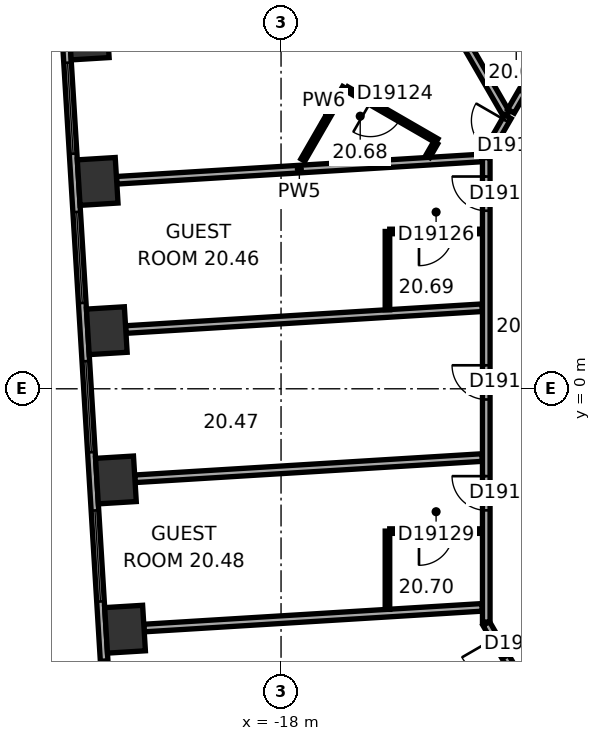
"""IFC4 building model, lengths in metres.
Left out: names, types, materials, properties, quantities, classifications, styles, units other than length and angle.
Written with IfcOpenShell. Run it as: python <this file> out.ifc"""

import sys

from ifc_helpers import new_model, si_unit, direction, frame, frame_2d, origin, origin_2d, place, context, subcontext, project, spatial, rectangle, extrude, element, fill, save


model = new_model("IFC4")
c1 = context("Model", 3, precision=1e-05, world=origin(), true_north=direction((0.0, 1.0)))
c2 = subcontext(c1, "Body", "Model", "MODEL_VIEW")
j1 = project(units=[si_unit("LENGTHUNIT", "METRE"), si_unit("PLANEANGLEUNIT", "RADIAN")], contexts=[c1])
p1 = place(None, origin())
s1 = spatial("IfcSite", under=j1, at=p1, CompositionType="ELEMENT")
p2 = place(p1, origin())
s2 = spatial("IfcBuilding", under=s1, at=p2, CompositionType="ELEMENT")
p3 = place(p2, frame((0.0, 0.0, 90.2)))
s3 = spatial("IfcBuildingStorey", under=s2, at=p3, CompositionType="ELEMENT", Elevation=90.2)
p4 = place(p3, frame((-23.066, 9.383, 0.0), z_axis=(0.0, 0.0, 1.0), x_axis=(0.061048539535, -0.998134798422, 0.0)))
e1 = element("IfcColumn", 1, at=p4, inside=s3, PredefinedType="COLUMN", context=c2, shape_type="SweptSolid", body=[
    extrude(rectangle(XDim=1.4, YDim=1.0, at=origin_2d()), origin(), (0.0, 0.0, 1.0), 3.3),
])
for number, where, z_axis, x_axis in (
    (2, (-22.826, 5.456, 0.0), (0.0, 0.0, 1.0), (0.061, -0.998, 0.0)),
    (3, (-22.585, 1.529, 0.0), (0.0, 0.0, 1.0), (0.061, -0.998, 0.0)),
    (4, (-22.345, -2.399, 0.0), (0.0, 0.0, 1.0), (0.061, -0.998, 0.0)),
    (5, (-22.105, -6.326, 0.0), (0.0, 0.0, 1.0), (0.061, -0.998, 0.0)),
):
    element("IfcColumn", number, at=place(p3, frame(where, z_axis=z_axis, x_axis=x_axis)), inside=s3, PredefinedType="COLUMN", context=c2, shape_type="SweptSolid", body=[
        extrude(rectangle(XDim=1.2, YDim=1.0, at=origin_2d()), origin(), (0.0, 0.0, 1.0), 3.3),
    ])
p5 = place(p3, frame((-23.713, 10.131, 0.0), z_axis=(0.0, 0.0, 1.0), x_axis=(0.061040439785, -0.998135293791, 0.0)))
e6 = element("IfcWall", 6, at=p5, inside=s3, PredefinedType="STANDARD", context=c2, shape_type="SweptSolid", body=[
    extrude(rectangle(XDim=21.246, YDim=0.2, at=frame_2d((10.623, 0.0))), origin(), (0.0, 0.0, 1.0), 3.3),
])
p6 = place(p5, frame((1.553, 0.0, 0.8)))
e7 = element("IfcOpeningElement", 7, at=p6, cuts=e6, PredefinedType="OPENING", context=c2, shape_type="SweptSolid", body=[
    extrude(rectangle(XDim=2.4, YDim=1.7, at=frame_2d((1.2, 0.85))), frame((0.0, 0.11, 0.0), z_axis=(0.0, -1.0, 0.0), x_axis=(1.0, 0.0, 0.0)), (0.0, 0.0, 1.0), 0.22),
])
p7 = place(p5, frame((5.488, 0.0, 0.8)))
e8 = element("IfcOpeningElement", 8, at=p7, cuts=e6, PredefinedType="OPENING", context=c2, shape_type="SweptSolid", body=[
    extrude(rectangle(XDim=2.4, YDim=1.7, at=frame_2d((1.2, 0.85))), frame((0.0, 0.11, 0.0), z_axis=(0.0, -1.0, 0.0), x_axis=(1.0, 0.0, 0.0)), (0.0, 0.0, 1.0), 0.22),
])
p8 = place(p5, frame((9.422, 0.0, 0.8)))
e9 = element("IfcOpeningElement", 9, at=p8, cuts=e6, PredefinedType="OPENING", context=c2, shape_type="SweptSolid", body=[
    extrude(rectangle(XDim=2.4, YDim=1.7, at=frame_2d((1.2, 0.85))), frame((0.0, 0.11, 0.0), z_axis=(0.0, -1.0, 0.0), x_axis=(1.0, 0.0, 0.0)), (0.0, 0.0, 1.0), 0.22),
])
p9 = place(p5, frame((13.357, 0.0, 0.8)))
e10 = element("IfcOpeningElement", 10, at=p9, cuts=e6, PredefinedType="OPENING", context=c2, shape_type="SweptSolid", body=[
    extrude(rectangle(XDim=2.4, YDim=1.7, at=frame_2d((1.2, 0.85))), frame((0.0, 0.11, 0.0), z_axis=(0.0, -1.0, 0.0), x_axis=(1.0, 0.0, 0.0)), (0.0, 0.0, 1.0), 0.22),
])
p10 = place(p5, frame((17.292, 0.0, 0.8)))
e11 = element("IfcOpeningElement", 11, at=p10, cuts=e6, PredefinedType="OPENING", context=c2, shape_type="SweptSolid", body=[
    extrude(rectangle(XDim=2.4, YDim=1.7, at=frame_2d((1.2, 0.85))), frame((0.0, 0.11, 0.0), z_axis=(0.0, -1.0, 0.0), x_axis=(1.0, 0.0, 0.0)), (0.0, 0.0, 1.0), 0.22),
])
p11 = place(p3, frame((-22.327, 5.486, 0.0), z_axis=(0.0, 0.0, 1.0), x_axis=(0.998135194863, 0.061042057435, 0.0)))
e12 = element("IfcWall", 12, at=p11, inside=s3, PredefinedType="PARTITIONING", context=c2, shape_type="SweptSolid", body=[
    extrude(rectangle(XDim=9.635, YDim=0.2, at=frame_2d((4.817, 0.0))), origin(), (0.0, 0.0, 1.0), 3.05),
])
p12 = place(p3, frame((-22.086, 1.559, 0.0), z_axis=(0.0, 0.0, 1.0), x_axis=(0.99813491363, 0.061046655873, 0.0)))
e13 = element("IfcWall", 13, at=p12, inside=s3, PredefinedType="PARTITIONING", context=c2, shape_type="SweptSolid", body=[
    extrude(rectangle(XDim=9.394, YDim=0.2, at=frame_2d((4.697, 0.0))), origin(), (0.0, 0.0, 1.0), 2.6),
])
p13 = place(p3, frame((-21.846, -2.368, 0.0), z_axis=(0.0, 0.0, 1.0), x_axis=(0.998134617584, 0.061051496129, 0.0)))
e14 = element("IfcWall", 14, at=p13, inside=s3, PredefinedType="PARTITIONING", context=c2, shape_type="SweptSolid", body=[
    extrude(rectangle(XDim=9.154, YDim=0.2, at=frame_2d((4.577, 0.0))), origin(), (0.0, 0.0, 1.0), 3.05),
])
p14 = place(p3, frame((-21.606, -6.295, 0.0), z_axis=(0.0, 0.0, 1.0), x_axis=(0.998134305525, 0.061056597794, 0.0)))
e15 = element("IfcWall", 15, at=p14, inside=s3, PredefinedType="PARTITIONING", context=c2, shape_type="SweptSolid", body=[
    extrude(rectangle(XDim=8.913, YDim=0.2, at=frame_2d((4.457, 0.0))), origin(), (0.0, 0.0, 1.0), 2.6),
])
p15 = place(p3, frame((-17.426, 6.019, 0.0), z_axis=(0.0, 0.0, 1.0), x_axis=(0.50002983664, 0.866008176907, 0.0)))
e16 = element("IfcWall", 16, at=p15, inside=s3, PredefinedType="PARTITIONING", context=c2, shape_type="SweptSolid", body=[
    extrude(rectangle(XDim=2.2, YDim=0.12, at=frame_2d((1.1, 0.0))), origin(), (0.0, 0.0, 1.0), 3.05),
])
p16 = place(p3, frame((-16.898, 15.59, 0.0), z_axis=(0.0, 0.0, 1.0), x_axis=(0.499994742786, -0.866028439017, 0.0)))
e17 = element("IfcWall", 17, at=p16, inside=s3, PredefinedType="PARTITIONING", context=c2, shape_type="SweptSolid", body=[
    extrude(rectangle(XDim=9.65, YDim=0.2, at=frame_2d((4.825, 0.0))), origin(), (0.0, 0.0, 1.0), 3.05),
])
p17 = place(p3, frame((-16.274, 7.895, 0.0), z_axis=(0.0, 0.0, 1.0), x_axis=(0.865997131366, -0.500048966069, 0.0)))
e18 = element("IfcWall", 18, at=p17, inside=s3, PredefinedType="PARTITIONING", context=c2, shape_type="SweptSolid", body=[
    extrude(rectangle(XDim=2.74, YDim=0.12, at=frame_2d((1.37, 0.0))), origin(), (0.0, 0.0, 1.0), 3.05),
])
p18 = place(p17, frame((0.72, 0.0, 0.0)))
e19 = element("IfcOpeningElement", 19, at=p18, cuts=e18, PredefinedType="OPENING", context=c2, shape_type="SweptSolid", body=[
    extrude(rectangle(XDim=0.9, YDim=2.1, at=frame_2d((0.45, 1.05))), frame((0.0, 0.07, 0.0), z_axis=(0.0, -1.0, 0.0), x_axis=(1.0, 0.0, 0.0)), (0.0, 0.0, 1.0), 0.14),
])
p19 = place(p3, frame((-15.2, -5.804, 0.0), z_axis=(0.0, 0.0, 1.0), x_axis=(0.0, 1.0, 0.0)))
e20 = element("IfcWall", 20, at=p19, inside=s3, PredefinedType="PARTITIONING", context=c2, shape_type="SweptSolid", body=[
    extrude(rectangle(XDim=2.059, YDim=0.12, at=frame_2d((1.03, 0.0))), origin(), (0.0, 0.0, 1.0), 3.05),
])
p20 = place(p3, frame((-15.2, 2.08, 0.0), z_axis=(0.0, 0.0, 1.0), x_axis=(0.0, 1.0, 0.0)))
e21 = element("IfcWall", 21, at=p20, inside=s3, PredefinedType="PARTITIONING", context=c2, shape_type="SweptSolid", body=[
    extrude(rectangle(XDim=2.059, YDim=0.12, at=frame_2d((1.03, 0.0))), origin(), (0.0, 0.0, 1.0), 3.05),
])
p21 = place(p3, frame((-15.14, -3.744, 0.0), z_axis=(0.0, 0.0, 1.0), x_axis=(1.0, 0.0, 0.0)))
e22 = element("IfcWall", 22, at=p21, inside=s3, PredefinedType="PARTITIONING", context=c2, shape_type="SweptSolid", body=[
    extrude(rectangle(XDim=2.44, YDim=0.12, at=frame_2d((1.22, 0.0))), origin(), (0.0, 0.0, 1.0), 3.05),
])
p22 = place(p21, frame((0.77, 0.0, 0.0)))
e23 = element("IfcOpeningElement", 23, at=p22, cuts=e22, PredefinedType="OPENING", context=c2, shape_type="SweptSolid", body=[
    extrude(rectangle(XDim=0.9, YDim=2.1, at=frame_2d((0.45, 1.05))), frame((0.0, 0.07, 0.0), z_axis=(0.0, -1.0, 0.0), x_axis=(1.0, 0.0, 0.0)), (0.0, 0.0, 1.0), 0.14),
])
p23 = place(p3, frame((-15.14, 4.139, 0.0), z_axis=(0.0, 0.0, 1.0), x_axis=(1.0, 0.0, 0.0)))
e24 = element("IfcWall", 24, at=p23, inside=s3, PredefinedType="PARTITIONING", context=c2, shape_type="SweptSolid", body=[
    extrude(rectangle(XDim=2.44, YDim=0.12, at=frame_2d((1.22, 0.0))), origin(), (0.0, 0.0, 1.0), 3.05),
])
p24 = place(p23, frame((0.77, 0.0, 0.0)))
e25 = element("IfcOpeningElement", 25, at=p24, cuts=e24, PredefinedType="OPENING", context=c2, shape_type="SweptSolid", body=[
    extrude(rectangle(XDim=0.9, YDim=2.1, at=frame_2d((0.45, 1.05))), frame((0.0, 0.07, 0.0), z_axis=(0.0, -1.0, 0.0), x_axis=(1.0, 0.0, 0.0)), (0.0, 0.0, 1.0), 0.14),
])
p25 = place(p3, frame((-13.931, 6.472, 0.0), z_axis=(0.0, 0.0, 1.0), x_axis=(-0.499739399214, -0.866175809448, 0.0)))
e26 = element("IfcWall", 26, at=p25, inside=s3, PredefinedType="PARTITIONING", context=c2, shape_type="SweptSolid", body=[
    extrude(rectangle(XDim=0.416, YDim=0.12, at=frame_2d((0.208, 0.0))), origin(), (0.0, 0.0, 1.0), 3.05),
])
p26 = place(p3, frame((-12.6, -6.177, 0.0), z_axis=(0.0, 0.0, 1.0), x_axis=(0.500063520245, -0.865988727248, 0.0)))
e27 = element("IfcWall", 27, at=p26, inside=s3, PredefinedType="PARTITIONING", context=c2, shape_type="SweptSolid", body=[
    extrude(rectangle(XDim=1.9, YDim=0.2, at=frame_2d((0.95, 0.0))), origin(), (0.0, 0.0, 1.0), 3.05),
])
p27 = place(p26, frame((0.45, 0.0, 0.0)))
e28 = element("IfcOpeningElement", 28, at=p27, cuts=e27, PredefinedType="OPENING", context=c2, shape_type="SweptSolid", body=[
    extrude(rectangle(XDim=1.0, YDim=2.1, at=frame_2d((0.5, 1.05))), frame((0.0, 0.11, 0.0), z_axis=(0.0, -1.0, 0.0), x_axis=(1.0, 0.0, 0.0)), (0.0, 0.0, 1.0), 0.22),
])
p28 = place(p3, frame((-12.6, 6.081, 0.0), z_axis=(0.0, 0.0, 1.0), x_axis=(0.0, -1.0, 0.0)))
e29 = element("IfcWall", 29, at=p28, inside=s3, PredefinedType="PARTITIONING", context=c2, shape_type="SweptSolid", body=[
    extrude(rectangle(XDim=12.219, YDim=0.2, at=frame_2d((6.109, 0.0))), origin(), (0.0, 0.0, 1.0), 3.05),
])
p29 = place(p28, frame((0.496, 0.0, 0.0)))
e30 = element("IfcOpeningElement", 30, at=p29, cuts=e29, PredefinedType="OPENING", context=c2, shape_type="SweptSolid", body=[
    extrude(rectangle(XDim=0.9, YDim=2.1, at=frame_2d((0.45, 1.05))), frame((0.0, 0.11, 0.0), z_axis=(0.0, -1.0, 0.0), x_axis=(1.0, 0.0, 0.0)), (0.0, 0.0, 1.0), 0.22),
])
p30 = place(p28, frame((5.463, 0.0, 0.0)))
e31 = element("IfcOpeningElement", 31, at=p30, cuts=e29, PredefinedType="OPENING", context=c2, shape_type="SweptSolid", body=[
    extrude(rectangle(XDim=0.9, YDim=2.1, at=frame_2d((0.45, 1.05))), frame((0.0, 0.11, 0.0), z_axis=(0.0, -1.0, 0.0), x_axis=(1.0, 0.0, 0.0)), (0.0, 0.0, 1.0), 0.22),
])
p31 = place(p28, frame((8.38, 0.0, 0.0)))
e32 = element("IfcOpeningElement", 32, at=p31, cuts=e29, PredefinedType="OPENING", context=c2, shape_type="SweptSolid", body=[
    extrude(rectangle(XDim=0.9, YDim=2.1, at=frame_2d((0.45, 1.05))), frame((0.0, 0.11, 0.0), z_axis=(0.0, -1.0, 0.0), x_axis=(1.0, 0.0, 0.0)), (0.0, 0.0, 1.0), 0.22),
])
p32 = place(p3, frame((-12.032, 7.162, 0.0), z_axis=(0.0, 0.0, 1.0), x_axis=(-0.499951829968, -0.866053212979, 0.0)))
e33 = element("IfcWall", 33, at=p32, inside=s3, PredefinedType="PARTITIONING", context=c2, shape_type="SweptSolid", body=[
    extrude(rectangle(XDim=1.136, YDim=0.2, at=frame_2d((0.568, 0.0))), origin(), (0.0, 0.0, 1.0), 3.05),
])
p33 = place(p32, frame((0.118, 0.0, 0.0)))
e34 = element("IfcOpeningElement", 34, at=p33, cuts=e33, PredefinedType="OPENING", context=c2, shape_type="SweptSolid", body=[
    extrude(rectangle(XDim=0.9, YDim=2.1, at=frame_2d((0.45, 1.05))), frame((0.0, 0.11, 0.0), z_axis=(0.0, -1.0, 0.0), x_axis=(1.0, 0.0, 0.0)), (0.0, 0.0, 1.0), 0.22),
])
p34 = place(p3, frame((-11.65, 7.823, 0.0), z_axis=(0.0, 0.0, 1.0), x_axis=(-0.50012165622, -0.865955154139, 0.0)))
e35 = element("IfcWall", 35, at=p34, inside=s3, PredefinedType="PARTITIONING", context=c2, shape_type="SweptSolid", body=[
    extrude(rectangle(XDim=0.6, YDim=0.2, at=frame_2d((0.3, 0.0))), origin(), (0.0, 0.0, 1.0), 3.05),
])
p35 = place(p3, frame((-7.865, 7.814, 0.0), z_axis=(0.0, 0.0, 1.0), x_axis=(-0.500004234368, 0.866022959057, 0.0)))
e36 = element("IfcWall", 36, at=p35, inside=s3, PredefinedType="PARTITIONING", context=c2, shape_type="SweptSolid", body=[
    extrude(rectangle(XDim=11.25, YDim=0.2, at=frame_2d((5.625, 0.0))), origin(), (0.0, 0.0, 1.0), 3.05),
])
p36 = place(p35, frame((0.5, 0.0, 0.0)))
e37 = element("IfcOpeningElement", 37, at=p36, cuts=e36, PredefinedType="OPENING", context=c2, shape_type="SweptSolid", body=[
    extrude(rectangle(XDim=0.9, YDim=2.1, at=frame_2d((0.45, 1.05))), frame((0.0, 0.11, 0.0), z_axis=(0.0, -1.0, 0.0), x_axis=(1.0, 0.0, 0.0)), (0.0, 0.0, 1.0), 0.22),
])
p37 = place(p6, origin())
e38 = element("IfcWindow", 38, at=p37, inside=s3, PartitioningType="SINGLE_PANEL", PredefinedType="WINDOW", context=c2, shape_type="SweptSolid", body=[
    extrude(rectangle(XDim=2.4, YDim=1.7, at=frame_2d((1.2, 0.85))), frame((0.0, 0.03, 0.0), z_axis=(0.0, -1.0, 0.0), x_axis=(1.0, 0.0, 0.0)), (0.0, 0.0, 1.0), 0.06),
])
fill(e7, e38)
p38 = place(p7, origin())
e39 = element("IfcWindow", 39, at=p38, inside=s3, PartitioningType="SINGLE_PANEL", PredefinedType="WINDOW", context=c2, shape_type="SweptSolid", body=[
    extrude(rectangle(XDim=2.4, YDim=1.7, at=frame_2d((1.2, 0.85))), frame((0.0, 0.03, 0.0), z_axis=(0.0, -1.0, 0.0), x_axis=(1.0, 0.0, 0.0)), (0.0, 0.0, 1.0), 0.06),
])
fill(e8, e39)
p39 = place(p8, origin())
e40 = element("IfcWindow", 40, at=p39, inside=s3, PartitioningType="SINGLE_PANEL", PredefinedType="WINDOW", context=c2, shape_type="SweptSolid", body=[
    extrude(rectangle(XDim=2.4, YDim=1.7, at=frame_2d((1.2, 0.85))), frame((0.0, 0.03, 0.0), z_axis=(0.0, -1.0, 0.0), x_axis=(1.0, 0.0, 0.0)), (0.0, 0.0, 1.0), 0.06),
])
fill(e9, e40)
p40 = place(p9, origin())
e41 = element("IfcWindow", 41, at=p40, inside=s3, PartitioningType="SINGLE_PANEL", PredefinedType="WINDOW", context=c2, shape_type="SweptSolid", body=[
    extrude(rectangle(XDim=2.4, YDim=1.7, at=frame_2d((1.2, 0.85))), frame((0.0, 0.03, 0.0), z_axis=(0.0, -1.0, 0.0), x_axis=(1.0, 0.0, 0.0)), (0.0, 0.0, 1.0), 0.06),
])
fill(e10, e41)
p41 = place(p10, origin())
e42 = element("IfcWindow", 42, at=p41, inside=s3, PartitioningType="SINGLE_PANEL", PredefinedType="WINDOW", context=c2, shape_type="SweptSolid", body=[
    extrude(rectangle(XDim=2.4, YDim=1.7, at=frame_2d((1.2, 0.85))), frame((0.0, 0.03, 0.0), z_axis=(0.0, -1.0, 0.0), x_axis=(1.0, 0.0, 0.0)), (0.0, 0.0, 1.0), 0.06),
])
fill(e11, e42)
p42 = place(p33, origin())
e43 = element("IfcDoor", 43, at=p42, inside=s3, OperationType="SINGLE_SWING_LEFT", PredefinedType="DOOR", context=c2, shape_type="SweptSolid", body=[
    extrude(rectangle(XDim=0.9, YDim=2.1, at=frame_2d((0.45, 1.05))), frame((0.0, 0.025, 0.0), z_axis=(0.0, -1.0, 0.0), x_axis=(1.0, 0.0, 0.0)), (0.0, 0.0, 1.0), 0.05),
])
fill(e34, e43)
p43 = place(p18, origin())
e44 = element("IfcDoor", 44, at=p43, inside=s3, OperationType="SINGLE_SWING_LEFT", PredefinedType="DOOR", context=c2, shape_type="SweptSolid", body=[
    extrude(rectangle(XDim=0.9, YDim=2.1, at=frame_2d((0.45, 1.05))), frame((0.0, 0.025, 0.0), z_axis=(0.0, -1.0, 0.0), x_axis=(1.0, 0.0, 0.0)), (0.0, 0.0, 1.0), 0.05),
])
fill(e19, e44)
p44 = place(p29, origin())
e45 = element("IfcDoor", 45, at=p44, inside=s3, OperationType="SINGLE_SWING_LEFT", PredefinedType="DOOR", context=c2, shape_type="SweptSolid", body=[
    extrude(rectangle(XDim=0.9, YDim=2.1, at=frame_2d((0.45, 1.05))), frame((0.0, 0.025, 0.0), z_axis=(0.0, -1.0, 0.0), x_axis=(1.0, 0.0, 0.0)), (0.0, 0.0, 1.0), 0.05),
])
fill(e30, e45)
p45 = place(p24, origin())
e46 = element("IfcDoor", 46, at=p45, inside=s3, OperationType="SINGLE_SWING_LEFT", PredefinedType="DOOR", context=c2, shape_type="SweptSolid", body=[
    extrude(rectangle(XDim=0.9, YDim=2.1, at=frame_2d((0.45, 1.05))), frame((0.0, 0.025, 0.0), z_axis=(0.0, -1.0, 0.0), x_axis=(1.0, 0.0, 0.0)), (0.0, 0.0, 1.0), 0.05),
])
fill(e25, e46)
p46 = place(p30, origin())
e47 = element("IfcDoor", 47, at=p46, inside=s3, OperationType="SINGLE_SWING_LEFT", PredefinedType="DOOR", context=c2, shape_type="SweptSolid", body=[
    extrude(rectangle(XDim=0.9, YDim=2.1, at=frame_2d((0.45, 1.05))), frame((0.0, 0.025, 0.0), z_axis=(0.0, -1.0, 0.0), x_axis=(1.0, 0.0, 0.0)), (0.0, 0.0, 1.0), 0.05),
])
fill(e31, e47)
p47 = place(p31, origin())
e48 = element("IfcDoor", 48, at=p47, inside=s3, OperationType="SINGLE_SWING_LEFT", PredefinedType="DOOR", context=c2, shape_type="SweptSolid", body=[
    extrude(rectangle(XDim=0.9, YDim=2.1, at=frame_2d((0.45, 1.05))), frame((0.0, 0.025, 0.0), z_axis=(0.0, -1.0, 0.0), x_axis=(1.0, 0.0, 0.0)), (0.0, 0.0, 1.0), 0.05),
])
fill(e32, e48)
p48 = place(p22, origin())
e49 = element("IfcDoor", 49, at=p48, inside=s3, OperationType="SINGLE_SWING_LEFT", PredefinedType="DOOR", context=c2, shape_type="SweptSolid", body=[
    extrude(rectangle(XDim=0.9, YDim=2.1, at=frame_2d((0.45, 1.05))), frame((0.0, 0.025, 0.0), z_axis=(0.0, -1.0, 0.0), x_axis=(1.0, 0.0, 0.0)), (0.0, 0.0, 1.0), 0.05),
])
fill(e23, e49)
p49 = place(p27, origin())
e50 = element("IfcDoor", 50, at=p49, inside=s3, OperationType="SINGLE_SWING_LEFT", PredefinedType="DOOR", context=c2, shape_type="SweptSolid", body=[
    extrude(rectangle(XDim=1.0, YDim=2.1, at=frame_2d((0.5, 1.05))), frame((0.0, 0.025, 0.0), z_axis=(0.0, -1.0, 0.0), x_axis=(1.0, 0.0, 0.0)), (0.0, 0.0, 1.0), 0.05),
])
fill(e28, e50)
save(model, sys.argv[1])
